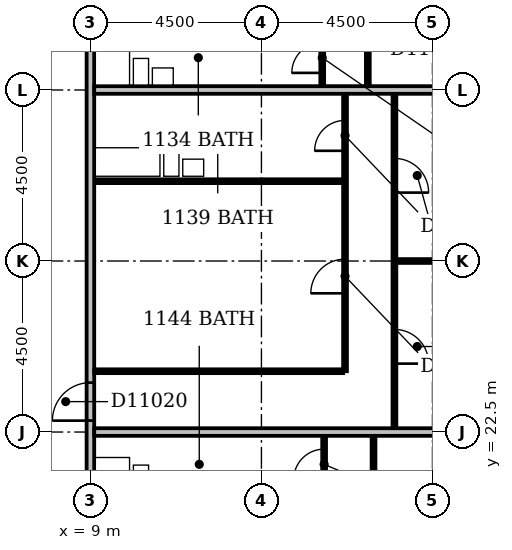
"""IFC4 building model, lengths in metres.
Left out: names, types, materials, properties, quantities, classifications, styles, units other than length and angle.
Written with IfcOpenShell. Run it as: python <this file> out.ifc"""

import sys

from ifc_helpers import new_model, si_unit, direction, frame, frame_2d, origin, place, context, subcontext, project, spatial, rectangle, extrude, element, fill, save


model = new_model("IFC4")
c1 = context("Model", 3, precision=1e-05, world=origin(), true_north=direction((0.0, 1.0)))
c2 = subcontext(c1, "Body", "Model", "MODEL_VIEW")
j1 = project(units=[si_unit("LENGTHUNIT", "METRE"), si_unit("PLANEANGLEUNIT", "RADIAN")], contexts=[c1])
p1 = place(None, origin())
s1 = spatial("IfcSite", under=j1, at=p1, CompositionType="ELEMENT")
p2 = place(p1, origin())
s2 = spatial("IfcBuilding", under=s1, at=p2, CompositionType="ELEMENT")
p3 = place(p2, frame((0.0, 0.0, 50.6)))
s3 = spatial("IfcBuildingStorey", under=s2, at=p3, CompositionType="ELEMENT", Elevation=50.6)
p4 = place(p3, frame((9.0, 5.0, 0.0), z_axis=(0.0, 0.0, 1.0), x_axis=(0.0, 1.0, 0.0)))
e1 = element("IfcWall", 1, at=p4, inside=s3, PredefinedType="PARTITIONING", context=c2, shape_type="SweptSolid", body=[
    extrude(rectangle(XDim=44.5, YDim=0.2, at=frame_2d((22.25, 0.0))), origin(), (0.0, 0.0, 1.0), 3.3),
])
p5 = place(p4, frame((28.45, 0.0, 0.0)))
e2 = element("IfcOpeningElement", 2, at=p5, cuts=e1, PredefinedType="OPENING", context=c2, shape_type="SweptSolid", body=[
    extrude(rectangle(XDim=1.0, YDim=2.1, at=frame_2d((0.5, 1.05))), frame((0.0, 0.112, 0.0), z_axis=(0.0, -1.0, 0.0), x_axis=(1.0, 0.0, 0.0)), (0.0, 0.0, 1.0), 0.224),
])
p6 = place(p4, frame((17.8, 0.0, 0.0)))
e3 = element("IfcOpeningElement", 3, at=p6, cuts=e1, PredefinedType="OPENING", context=c2, shape_type="SweptSolid", body=[
    extrude(rectangle(XDim=1.0, YDim=2.1, at=frame_2d((0.5, 1.05))), frame((0.0, 0.112, 0.0), z_axis=(0.0, -1.0, 0.0), x_axis=(1.0, 0.0, 0.0)), (0.0, 0.0, 1.0), 0.224),
])
p7 = place(p4, frame((14.55, 0.0, 0.0)))
e4 = element("IfcOpeningElement", 4, at=p7, cuts=e1, PredefinedType="OPENING", context=c2, shape_type="SweptSolid", body=[
    extrude(rectangle(XDim=1.0, YDim=2.1, at=frame_2d((0.5, 1.05))), frame((0.0, 0.112, 0.0), z_axis=(0.0, -1.0, 0.0), x_axis=(1.0, 0.0, 0.0)), (0.0, 0.0, 1.0), 0.224),
])
p8 = place(p4, frame((11.7, 0.0, 0.0)))
e5 = element("IfcOpeningElement", 5, at=p8, cuts=e1, PredefinedType="OPENING", context=c2, shape_type="SweptSolid", body=[
    extrude(rectangle(XDim=1.0, YDim=2.1, at=frame_2d((0.5, 1.05))), frame((0.0, 0.112, 0.0), z_axis=(0.0, -1.0, 0.0), x_axis=(1.0, 0.0, 0.0)), (0.0, 0.0, 1.0), 0.224),
])
p9 = place(p4, frame((35.0, 0.0, 0.0)))
e6 = element("IfcOpeningElement", 6, at=p9, cuts=e1, PredefinedType="OPENING", context=c2, shape_type="SweptSolid", body=[
    extrude(rectangle(XDim=0.9, YDim=2.1, at=frame_2d((0.45, 1.05))), frame((0.0, 0.112, 0.0), z_axis=(0.0, -1.0, 0.0), x_axis=(1.0, 0.0, 0.0)), (0.0, 0.0, 1.0), 0.224),
])
p10 = place(p4, frame((1.5, 0.0, 0.0)))
e7 = element("IfcOpeningElement", 7, at=p10, cuts=e1, PredefinedType="OPENING", context=c2, shape_type="SweptSolid", body=[
    extrude(rectangle(XDim=0.9, YDim=2.1, at=frame_2d((0.45, 1.05))), frame((0.0, 0.112, 0.0), z_axis=(0.0, -1.0, 0.0), x_axis=(1.0, 0.0, 0.0)), (0.0, 0.0, 1.0), 0.224),
])
p11 = place(p3, frame((16.45, 18.1, 0.0), z_axis=(0.0, 0.0, 1.0), x_axis=(0.0, 1.0, 0.0)))
e8 = element("IfcWall", 8, at=p11, inside=s3, PredefinedType="PARTITIONING", context=c2, shape_type="SweptSolid", body=[
    extrude(rectangle(XDim=4.3, YDim=0.1, at=frame_2d((2.15, 0.0))), origin(), (0.0, 0.0, 1.0), 3.3),
])
p12 = place(p11, frame((1.7, 0.0, 0.0)))
e9 = element("IfcOpeningElement", 9, at=p12, cuts=e8, PredefinedType="OPENING", context=c2, shape_type="SweptSolid", body=[
    extrude(rectangle(XDim=0.9, YDim=2.1, at=frame_2d((0.45, 1.05))), frame((0.0, 0.062, 0.0), z_axis=(0.0, -1.0, 0.0), x_axis=(1.0, 0.0, 0.0)), (0.0, 0.0, 1.0), 0.124),
])
p13 = place(p3, frame((15.15, 20.8, 0.0), z_axis=(0.0, 0.0, 1.0), x_axis=(0.0, 1.0, 0.0)))
e10 = element("IfcWall", 10, at=p13, inside=s3, PredefinedType="PARTITIONING", context=c2, shape_type="SweptSolid", body=[
    extrude(rectangle(XDim=1.6, YDim=0.1, at=frame_2d((0.8, 0.0))), origin(), (0.0, 0.0, 1.0), 3.3),
])
p14 = place(p13, frame((0.45, 0.0, 0.0)))
e11 = element("IfcOpeningElement", 11, at=p14, cuts=e10, PredefinedType="OPENING", context=c2, shape_type="SweptSolid", body=[
    extrude(rectangle(XDim=0.8, YDim=2.1, at=frame_2d((0.4, 1.05))), frame((0.0, 0.062, 0.0), z_axis=(0.0, -1.0, 0.0), x_axis=(1.0, 0.0, 0.0)), (0.0, 0.0, 1.0), 0.124),
])
p15 = place(p3, frame((9.1, 22.5, 0.0), z_axis=(0.0, 0.0, 1.0), x_axis=(1.0, 0.0, 0.0)))
e12 = element("IfcWall", 12, at=p15, inside=s3, PredefinedType="PARTITIONING", context=c2, shape_type="SweptSolid", body=[
    extrude(rectangle(XDim=12.8, YDim=0.2, at=frame_2d((6.4, 0.0))), origin(), (0.0, 0.0, 1.0), 3.3),
])
p16 = place(p3, frame((17.0, 22.6, 0.0), z_axis=(0.0, 0.0, 1.0), x_axis=(0.0, 1.0, 0.0)))
e13 = element("IfcWall", 13, at=p16, inside=s3, PredefinedType="PARTITIONING", context=c2, shape_type="SweptSolid", body=[
    extrude(rectangle(XDim=8.8, YDim=0.1, at=frame_2d((4.4, 0.0))), origin(), (0.0, 0.0, 1.0), 3.3),
])
p17 = place(p16, frame((1.7, 0.0, 0.0)))
e14 = element("IfcOpeningElement", 14, at=p17, cuts=e13, PredefinedType="OPENING", context=c2, shape_type="SweptSolid", body=[
    extrude(rectangle(XDim=0.9, YDim=2.1, at=frame_2d((0.45, 1.05))), frame((0.0, 0.062, 0.0), z_axis=(0.0, -1.0, 0.0), x_axis=(1.0, 0.0, 0.0)), (0.0, 0.0, 1.0), 0.124),
])
p18 = place(p16, frame((6.2, 0.0, 0.0)))
e15 = element("IfcOpeningElement", 15, at=p18, cuts=e13, PredefinedType="OPENING", context=c2, shape_type="SweptSolid", body=[
    extrude(rectangle(XDim=0.9, YDim=2.1, at=frame_2d((0.45, 1.05))), frame((0.0, 0.062, 0.0), z_axis=(0.0, -1.0, 0.0), x_axis=(1.0, 0.0, 0.0)), (0.0, 0.0, 1.0), 0.124),
])
p19 = place(p3, frame((9.1, 24.1, 0.0), z_axis=(0.0, 0.0, 1.0), x_axis=(1.0, 0.0, 0.0)))
e16 = element("IfcWall", 16, at=p19, inside=s3, PredefinedType="PARTITIONING", context=c2, shape_type="SweptSolid", body=[
    extrude(rectangle(XDim=6.55, YDim=0.1, at=frame_2d((3.275, 0.0))), origin(), (0.0, 0.0, 1.0), 3.3),
])
p20 = place(p3, frame((15.7, 24.1, 0.0), z_axis=(0.0, 0.0, 1.0), x_axis=(0.0, 1.0, 0.0)))
e17 = element("IfcWall", 17, at=p20, inside=s3, PredefinedType="PARTITIONING", context=c2, shape_type="SweptSolid", body=[
    extrude(rectangle(XDim=7.3, YDim=0.1, at=frame_2d((3.65, 0.0))), origin(), (0.0, 0.0, 1.0), 3.3),
])
p21 = place(p20, frame((5.8, 0.0, 0.0)))
e18 = element("IfcOpeningElement", 18, at=p21, cuts=e17, PredefinedType="OPENING", context=c2, shape_type="SweptSolid", body=[
    extrude(rectangle(XDim=0.8, YDim=2.1, at=frame_2d((0.4, 1.05))), frame((0.0, 0.062, 0.0), z_axis=(0.0, -1.0, 0.0), x_axis=(1.0, 0.0, 0.0)), (0.0, 0.0, 1.0), 0.124),
])
p22 = place(p20, frame((2.05, 0.0, 0.0)))
e19 = element("IfcOpeningElement", 19, at=p22, cuts=e17, PredefinedType="OPENING", context=c2, shape_type="SweptSolid", body=[
    extrude(rectangle(XDim=0.9, YDim=2.1, at=frame_2d((0.45, 1.05))), frame((0.0, 0.062, 0.0), z_axis=(0.0, -1.0, 0.0), x_axis=(1.0, 0.0, 0.0)), (0.0, 0.0, 1.0), 0.124),
])
p23 = place(p3, frame((17.05, 27.0, 0.0), z_axis=(0.0, 0.0, 1.0), x_axis=(1.0, 0.0, 0.0)))
e20 = element("IfcWall", 20, at=p23, inside=s3, PredefinedType="PARTITIONING", context=c2, shape_type="SweptSolid", body=[
    extrude(rectangle(XDim=4.85, YDim=0.1, at=frame_2d((2.425, 0.0))), origin(), (0.0, 0.0, 1.0), 2.7),
])
p24 = place(p3, frame((9.1, 29.1, 0.0), z_axis=(0.0, 0.0, 1.0), x_axis=(1.0, 0.0, 0.0)))
e21 = element("IfcWall", 21, at=p24, inside=s3, PredefinedType="PLUMBINGWALL", context=c2, shape_type="SweptSolid", body=[
    extrude(rectangle(XDim=6.55, YDim=0.1, at=frame_2d((3.275, 0.0))), origin(), (0.0, 0.0, 1.0), 3.3),
])
p25 = place(p3, frame((9.1, 31.5, 0.0), z_axis=(0.0, 0.0, 1.0), x_axis=(1.0, 0.0, 0.0)))
e22 = element("IfcWall", 22, at=p25, inside=s3, PredefinedType="PARTITIONING", context=c2, shape_type="SweptSolid", body=[
    extrude(rectangle(XDim=12.8, YDim=0.2, at=frame_2d((6.4, 0.0))), origin(), (0.0, 0.0, 1.0), 3.3),
])
p26 = place(p3, frame((15.1, 31.6, 0.0), z_axis=(0.0, 0.0, 1.0), x_axis=(0.0, 1.0, 0.0)))
e23 = element("IfcWall", 23, at=p26, inside=s3, PredefinedType="PARTITIONING", context=c2, shape_type="SweptSolid", body=[
    extrude(rectangle(XDim=1.6, YDim=0.1, at=frame_2d((0.8, 0.0))), origin(), (0.0, 0.0, 1.0), 3.3),
])
p27 = place(p26, frame((0.35, 0.0, 0.0)))
e24 = element("IfcOpeningElement", 24, at=p27, cuts=e23, PredefinedType="OPENING", context=c2, shape_type="SweptSolid", body=[
    extrude(rectangle(XDim=0.8, YDim=2.1, at=frame_2d((0.4, 1.05))), frame((0.0, 0.062, 0.0), z_axis=(0.0, -1.0, 0.0), x_axis=(1.0, 0.0, 0.0)), (0.0, 0.0, 1.0), 0.124),
])
p28 = place(p3, frame((16.3, 31.6, 0.0), z_axis=(0.0, 0.0, 1.0), x_axis=(0.0, 1.0, 0.0)))
e25 = element("IfcWall", 25, at=p28, inside=s3, PredefinedType="PARTITIONING", context=c2, shape_type="SweptSolid", body=[
    extrude(rectangle(XDim=4.3, YDim=0.1, at=frame_2d((2.15, 0.0))), origin(), (0.0, 0.0, 1.0), 3.3),
])
p29 = place(p28, frame((1.7, 0.0, 0.0)))
e26 = element("IfcOpeningElement", 26, at=p29, cuts=e25, PredefinedType="OPENING", context=c2, shape_type="SweptSolid", body=[
    extrude(rectangle(XDim=0.9, YDim=2.1, at=frame_2d((0.45, 1.05))), frame((0.0, 0.062, 0.0), z_axis=(0.0, -1.0, 0.0), x_axis=(1.0, 0.0, 0.0)), (0.0, 0.0, 1.0), 0.124),
])
p30 = place(p6, origin())
e27 = element("IfcDoor", 27, at=p30, inside=s3, OperationType="SINGLE_SWING_LEFT", PredefinedType="DOOR", context=c2, shape_type="SweptSolid", body=[
    extrude(rectangle(XDim=1.0, YDim=2.1, at=frame_2d((0.5, 1.05))), frame((0.0, 0.025, 0.0), z_axis=(0.0, -1.0, 0.0), x_axis=(1.0, 0.0, 0.0)), (0.0, 0.0, 1.0), 0.05),
])
fill(e3, e27)
p31 = place(p14, origin())
e28 = element("IfcDoor", 28, at=p31, inside=s3, OperationType="SINGLE_SWING_LEFT", PredefinedType="DOOR", context=c2, shape_type="SweptSolid", body=[
    extrude(rectangle(XDim=0.8, YDim=2.1, at=frame_2d((0.4, 1.05))), frame((0.0, 0.025, 0.0), z_axis=(0.0, -1.0, 0.0), x_axis=(1.0, 0.0, 0.0)), (0.0, 0.0, 1.0), 0.05),
])
fill(e11, e28)
p32 = place(p17, frame((0.9, 0.0, 0.0), z_axis=(0.0, 0.0, 1.0), x_axis=(-1.0, 0.0, 0.0)))
e29 = element("IfcDoor", 29, at=p32, inside=s3, OperationType="SINGLE_SWING_RIGHT", PredefinedType="DOOR", context=c2, shape_type="SweptSolid", body=[
    extrude(rectangle(XDim=0.9, YDim=2.1, at=frame_2d((0.45, 1.05))), frame((0.0, 0.025, 0.0), z_axis=(0.0, -1.0, 0.0), x_axis=(1.0, 0.0, 0.0)), (0.0, 0.0, 1.0), 0.05),
])
fill(e14, e29)
p33 = place(p18, frame((0.9, 0.0, 0.0), z_axis=(0.0, 0.0, 1.0), x_axis=(-1.0, 0.0, 0.0)))
e30 = element("IfcDoor", 30, at=p33, inside=s3, OperationType="SINGLE_SWING_RIGHT", PredefinedType="DOOR", context=c2, shape_type="SweptSolid", body=[
    extrude(rectangle(XDim=0.9, YDim=2.1, at=frame_2d((0.45, 1.05))), frame((0.0, 0.025, 0.0), z_axis=(0.0, -1.0, 0.0), x_axis=(1.0, 0.0, 0.0)), (0.0, 0.0, 1.0), 0.05),
])
fill(e15, e30)
p34 = place(p21, origin())
e31 = element("IfcDoor", 31, at=p34, inside=s3, OperationType="SINGLE_SWING_LEFT", PredefinedType="DOOR", context=c2, shape_type="SweptSolid", body=[
    extrude(rectangle(XDim=0.8, YDim=2.1, at=frame_2d((0.4, 1.05))), frame((0.0, 0.025, 0.0), z_axis=(0.0, -1.0, 0.0), x_axis=(1.0, 0.0, 0.0)), (0.0, 0.0, 1.0), 0.05),
])
fill(e18, e31)
p35 = place(p22, origin())
e32 = element("IfcDoor", 32, at=p35, inside=s3, OperationType="SINGLE_SWING_LEFT", PredefinedType="DOOR", context=c2, shape_type="SweptSolid", body=[
    extrude(rectangle(XDim=0.9, YDim=2.1, at=frame_2d((0.45, 1.05))), frame((0.0, 0.025, 0.0), z_axis=(0.0, -1.0, 0.0), x_axis=(1.0, 0.0, 0.0)), (0.0, 0.0, 1.0), 0.05),
])
fill(e19, e32)
p36 = place(p27, origin())
e33 = element("IfcDoor", 33, at=p36, inside=s3, OperationType="SINGLE_SWING_LEFT", PredefinedType="DOOR", context=c2, shape_type="SweptSolid", body=[
    extrude(rectangle(XDim=0.8, YDim=2.1, at=frame_2d((0.4, 1.05))), frame((0.0, 0.025, 0.0), z_axis=(0.0, -1.0, 0.0), x_axis=(1.0, 0.0, 0.0)), (0.0, 0.0, 1.0), 0.05),
])
fill(e24, e33)
save(model, sys.argv[1])
